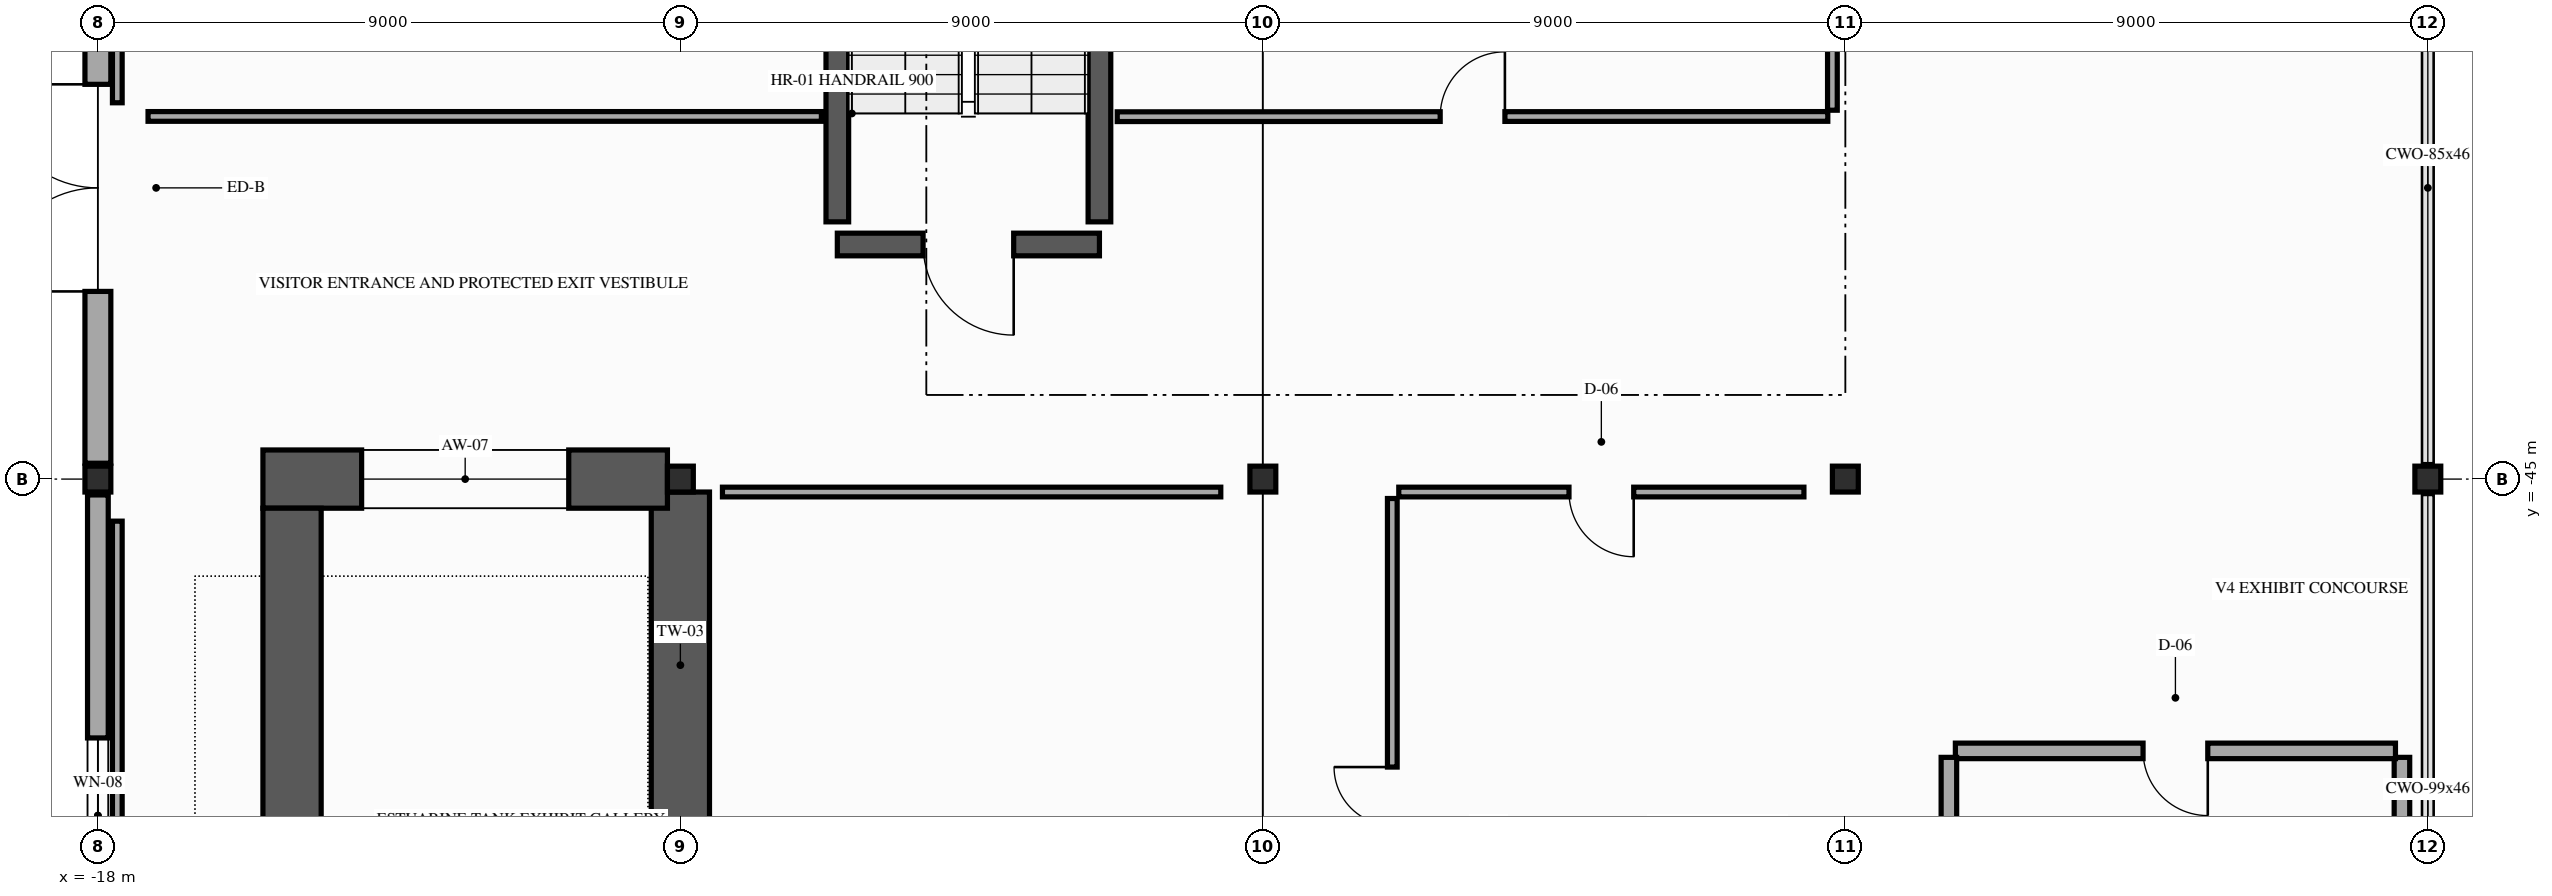
"""IFC4 building model, lengths in metres.
Left out: names, types, materials, properties, quantities, classifications, styles, units other than length and angle.
Written with IfcOpenShell. Run it as: python <this file> out.ifc"""

import sys

from ifc_helpers import new_model, si_unit, direction, frame, frame_2d, origin, origin_2d, place, context, subcontext, project, spatial, rectangle, i_section, extrude, element, fill, save


model = new_model("IFC4")
c1 = context("Model", 3, precision=1e-05, world=origin(), true_north=direction((0.0, 1.0)))
c2 = subcontext(c1, "Body", "Model", "MODEL_VIEW")
j1 = project(units=[si_unit("LENGTHUNIT", "METRE"), si_unit("PLANEANGLEUNIT", "RADIAN")], contexts=[c1])
p1 = place(None, origin())
s1 = spatial("IfcSite", under=j1, at=p1, CompositionType="ELEMENT")
p2 = place(p1, origin())
s2 = spatial("IfcBuilding", under=s1, at=p2, CompositionType="ELEMENT")
p3 = place(p2, origin())
s3 = spatial("IfcBuildingStorey", under=s2, at=p3, CompositionType="ELEMENT", Elevation=0.0)
for number, where, z_axis, x_axis in (
    (1, (-18.0, -45.0, 0.0), (0.0, 0.0, 1.0), (1.0, 0.0, 0.0)),
    (2, (-9.0, -45.0, 0.0), (0.0, 0.0, 1.0), (1.0, 0.0, 0.0)),
    (3, (0.0, -45.0, 0.0), (0.0, 0.0, 1.0), (1.0, 0.0, 0.0)),
    (4, (9.0, -45.0, 0.0), (0.0, 0.0, 1.0), (1.0, 0.0, 0.0)),
    (5, (18.0, -45.0, 0.0), (0.0, 0.0, 1.0), (1.0, 0.0, 0.0)),
):
    element("IfcColumn", number, at=place(p3, frame(where, z_axis=z_axis, x_axis=x_axis)), inside=s3, PredefinedType="COLUMN", context=c2, shape_type="SweptSolid", body=[
        extrude(i_section(OverallWidth=0.4, OverallDepth=0.4, WebThickness=0.013, FlangeThickness=0.021, FilletRadius=0.022, at=origin_2d()), origin(), (0.0, 0.0, 1.0), 5.4),
    ])
p4 = place(p3, frame((-9.0, -50.55, 0.0), z_axis=(0.0, 0.0, 1.0), x_axis=(0.0, 1.0, 0.0)))
e6 = element("IfcWall", 6, at=p4, inside=s3, PredefinedType="SHEAR", context=c2, shape_type="SweptSolid", body=[
    extrude(rectangle(XDim=5.35, YDim=0.9, at=frame_2d((2.675, 0.0))), origin(), (0.0, 0.0, 1.0), 4.5),
])
p5 = place(p3, frame((-9.2, -45.0, 0.0), z_axis=(0.0, 0.0, 1.0), x_axis=(-1.0, 0.0, 0.0)))
e7 = element("IfcWall", 7, at=p5, inside=s3, PredefinedType="SHEAR", context=c2, shape_type="SweptSolid", body=[
    extrude(rectangle(XDim=6.25, YDim=0.9, at=frame_2d((3.125, 0.0))), origin(), (0.0, 0.0, 1.0), 4.5),
])
p6 = place(p5, frame((1.525, 0.0, 0.8)))
e8 = element("IfcOpeningElement", 8, at=p6, cuts=e7, PredefinedType="OPENING", context=c2, shape_type="SweptSolid", body=[
    extrude(rectangle(XDim=3.2, YDim=2.2, at=frame_2d((1.6, 1.1))), frame((0.0, 0.46, 0.0), z_axis=(0.0, -1.0, 0.0), x_axis=(1.0, 0.0, 0.0)), (0.0, 0.0, 1.0), 0.92),
])
p7 = place(p3, frame((-15.0, -45.45, 0.0), z_axis=(0.0, 0.0, 1.0), x_axis=(0.0, -1.0, 0.0)))
e9 = element("IfcWall", 9, at=p7, inside=s3, PredefinedType="SHEAR", context=c2, shape_type="SweptSolid", body=[
    extrude(rectangle(XDim=5.1, YDim=0.9, at=frame_2d((2.55, 0.0))), origin(), (0.0, 0.0, 1.0), 4.5),
])
p8 = place(p3, frame((-18.0, -55.155, 0.0), z_axis=(0.0, 0.0, 1.0), x_axis=(0.0, 1.0, 0.0)))
e10 = element("IfcWall", 10, at=p8, inside=s3, PredefinedType="SOLIDWALL", context=c2, shape_type="SweptSolid", body=[
    extrude(rectangle(XDim=9.91, YDim=0.32, at=frame_2d((4.955, 0.0))), origin(), (0.0, 0.0, 1.0), 4.517),
])
p9 = place(p8, frame((3.755, 0.0, 0.9)))
e11 = element("IfcOpeningElement", 11, at=p9, cuts=e10, PredefinedType="OPENING", context=c2, shape_type="SweptSolid", body=[
    extrude(rectangle(XDim=2.4, YDim=2.4, at=frame_2d((1.2, 1.2))), frame((0.0, 0.17, 0.0), z_axis=(0.0, -1.0, 0.0), x_axis=(1.0, 0.0, 0.0)), (0.0, 0.0, 1.0), 0.34),
])
p10 = place(p3, frame((-18.0, -44.755, 0.0), z_axis=(0.0, 0.0, 1.0), x_axis=(0.0, 1.0, 0.0)))
e12 = element("IfcWall", 12, at=p10, inside=s3, PredefinedType="SOLIDWALL", context=c2, shape_type="SweptSolid", body=[
    extrude(rectangle(XDim=8.51, YDim=0.4, at=frame_2d((4.255, 0.0))), origin(), (0.0, 0.0, 1.0), 4.517),
])
p11 = place(p10, frame((2.655, 0.0, 0.0)))
e13 = element("IfcOpeningElement", 13, at=p11, cuts=e12, PredefinedType="OPENING", context=c2, shape_type="SweptSolid", body=[
    extrude(rectangle(XDim=3.2, YDim=2.8, at=frame_2d((1.6, 1.4))), frame((0.0, 0.21, 0.0), z_axis=(0.0, -1.0, 0.0), x_axis=(1.0, 0.0, 0.0)), (0.0, 0.0, 1.0), 0.42),
])
p12 = place(p3, frame((-2.525, -41.375, 0.0), z_axis=(0.0, 0.0, 1.0), x_axis=(-1.0, 0.0, 0.0)))
e14 = element("IfcWall", 14, at=p12, inside=s3, PredefinedType="SHEAR", context=c2, shape_type="SweptSolid", body=[
    extrude(rectangle(XDim=4.05, YDim=0.35, at=frame_2d((2.025, 0.0))), origin(), (0.0, 0.0, 1.0), 5.12),
])
p13 = place(p12, frame((1.325, 0.0, 0.0)))
e15 = element("IfcOpeningElement", 15, at=p13, cuts=e14, PredefinedType="OPENING", context=c2, shape_type="SweptSolid", body=[
    extrude(rectangle(XDim=1.4, YDim=2.2, at=frame_2d((0.7, 1.1))), frame((0.0, 0.185, 0.0), z_axis=(0.0, -1.0, 0.0), x_axis=(1.0, 0.0, 0.0)), (0.0, 0.0, 1.0), 0.37),
])
for number, where, z_axis, x_axis in (
    (16, (-6.575, -41.025, 0.0), (0.0, 0.0, 1.0), (0.0, 1.0, 0.0)),
    (17, (-2.525, -41.025, 0.0), (0.0, 0.0, 1.0), (0.0, 1.0, 0.0)),
):
    element("IfcWall", number, at=place(p3, frame(where, z_axis=z_axis, x_axis=x_axis)), inside=s3, PredefinedType="SHEAR", context=c2, shape_type="SweptSolid", body=[
        extrude(rectangle(XDim=9.1, YDim=0.35, at=frame_2d((4.55, 0.0))), origin(), (0.0, 0.0, 1.0), 5.12),
    ])
p14 = place(p3, frame((2.0, -55.4, 0.0), z_axis=(0.0, 0.0, 1.0), x_axis=(0.0, 1.0, 0.0)))
e18 = element("IfcWall", 18, at=p14, inside=s3, PredefinedType="PARTITIONING", context=c2, shape_type="SweptSolid", body=[
    extrude(rectangle(XDim=10.1, YDim=0.15, at=frame_2d((5.05, 0.0))), origin(), (0.0, 0.0, 1.0), 3.755),
])
p15 = place(p14, frame((4.15, 0.0, 0.0)))
e19 = element("IfcOpeningElement", 19, at=p15, cuts=e18, PredefinedType="OPENING", context=c2, shape_type="SweptSolid", body=[
    extrude(rectangle(XDim=1.8, YDim=2.3, at=frame_2d((0.9, 1.15))), frame((0.0, 0.085, 0.0), z_axis=(0.0, -1.0, 0.0), x_axis=(1.0, 0.0, 0.0)), (0.0, 0.0, 1.0), 0.17),
])
p16 = place(p3, frame((-0.65, -45.2, 0.0), z_axis=(0.0, 0.0, 1.0), x_axis=(-1.0, 0.0, 0.0)))
e20 = element("IfcWall", 20, at=p16, inside=s3, PredefinedType="PARTITIONING", context=c2, shape_type="SweptSolid", body=[
    extrude(rectangle(XDim=7.7, YDim=0.15, at=frame_2d((3.85, 0.0))), origin(), (0.0, 0.0, 1.0), 4.517),
])
p17 = place(p3, frame((-17.7, -45.65, 0.0), z_axis=(0.0, 0.0, 1.0), x_axis=(0.0, -1.0, 0.0)))
e21 = element("IfcWall", 21, at=p17, inside=s3, PredefinedType="PARTITIONING", context=c2, shape_type="SweptSolid", body=[
    extrude(rectangle(XDim=9.5, YDim=0.15, at=frame_2d((4.75, 0.0))), origin(), (0.0, 0.0, 1.0), 4.617),
])
p18 = place(p3, frame((17.6, -55.15, 0.0), z_axis=(0.0, 0.0, 1.0), x_axis=(0.0, 1.0, 0.0)))
e22 = element("IfcWall", 22, at=p18, inside=s3, PredefinedType="PARTITIONING", context=c2, shape_type="SweptSolid", body=[
    extrude(rectangle(XDim=5.85, YDim=0.24, at=frame_2d((2.925, 0.0))), origin(), (0.0, 0.0, 1.0), 4.617),
])
p19 = place(p3, frame((17.5, -49.2, 0.0), z_axis=(0.0, 0.0, 1.0), x_axis=(-1.0, 0.0, 0.0)))
e23 = element("IfcWall", 23, at=p19, inside=s3, PredefinedType="PARTITIONING", context=c2, shape_type="SweptSolid", body=[
    extrude(rectangle(XDim=6.8, YDim=0.24, at=frame_2d((3.4, 0.0))), origin(), (0.0, 0.0, 1.0), 4.617),
])
p20 = place(p19, frame((2.9, 0.0, 0.0)))
e24 = element("IfcOpeningElement", 24, at=p20, cuts=e23, PredefinedType="OPENING", context=c2, shape_type="SweptSolid", body=[
    extrude(rectangle(XDim=1.0, YDim=2.15, at=frame_2d((0.5, 1.075))), frame((0.0, 0.13, 0.0), z_axis=(0.0, -1.0, 0.0), x_axis=(1.0, 0.0, 0.0)), (0.0, 0.0, 1.0), 0.26),
])
p21 = place(p3, frame((10.6, -49.3, 0.0), z_axis=(0.0, 0.0, 1.0), x_axis=(0.0, -1.0, 0.0)))
e25 = element("IfcWall", 25, at=p21, inside=s3, PredefinedType="PARTITIONING", context=c2, shape_type="SweptSolid", body=[
    extrude(rectangle(XDim=6.1, YDim=0.24, at=frame_2d((3.05, 0.0))), origin(), (0.0, 0.0, 1.0), 4.517),
])
p22 = place(p3, frame((-17.7, -36.64, 0.0), z_axis=(0.0, 0.0, 1.0), x_axis=(0.0, -1.0, 0.0)))
e26 = element("IfcWall", 26, at=p22, inside=s3, PredefinedType="PARTITIONING", context=c2, shape_type="SweptSolid", body=[
    extrude(rectangle(XDim=2.545, YDim=0.15, at=frame_2d((1.272, 0.0))), origin(), (0.0, 0.0, 1.0), 4.605),
])
p23 = place(p3, frame((-17.225, -39.396, 0.0), z_axis=(0.0, 0.0, 1.0), x_axis=(1.0, 0.0, 0.0)))
e27 = element("IfcWall", 27, at=p23, inside=s3, PredefinedType="PARTITIONING", context=c2, shape_type="SweptSolid", body=[
    extrude(rectangle(XDim=10.404, YDim=0.15, at=frame_2d((5.202, 0.0))), origin(), (0.0, 0.0, 1.0), 4.605),
])
p24 = place(p3, frame((-2.25, -39.4, 0.0), z_axis=(0.0, 0.0, 1.0), x_axis=(0.999999936706, 0.000355792728, 0.0)))
e28 = element("IfcWall", 28, at=p24, inside=s3, PredefinedType="PARTITIONING", context=c2, shape_type="SweptSolid", body=[
    extrude(rectangle(XDim=10.979, YDim=0.15, at=frame_2d((5.49, 0.0))), origin(), (0.0, 0.0, 1.0), 4.605),
])
p25 = place(p24, frame((4.99, 0.0, 0.0)))
e29 = element("IfcOpeningElement", 29, at=p25, cuts=e28, PredefinedType="OPENING", context=c2, shape_type="SweptSolid", body=[
    extrude(rectangle(XDim=1.0, YDim=2.15, at=frame_2d((0.5, 1.075))), frame((0.0, 0.085, 0.0), z_axis=(0.0, -1.0, 0.0), x_axis=(1.0, 0.0, 0.0)), (0.0, 0.0, 1.0), 0.17),
])
p26 = place(p3, frame((8.8, -39.3, 0.0), z_axis=(0.0, 0.0, 1.0), x_axis=(0.0, 1.0, 0.0)))
e30 = element("IfcWall", 30, at=p26, inside=s3, PredefinedType="PARTITIONING", context=c2, shape_type="SweptSolid", body=[
    extrude(rectangle(XDim=2.66, YDim=0.15, at=frame_2d((1.33, 0.0))), origin(), (0.0, 0.0, 1.0), 4.605),
])
p27 = place(p3, frame((8.36, -45.2, 0.0), z_axis=(0.0, 0.0, 1.0), x_axis=(-1.0, 0.0, 0.0)))
e31 = element("IfcWall", 31, at=p27, inside=s3, PredefinedType="PARTITIONING", context=c2, shape_type="SweptSolid", body=[
    extrude(rectangle(XDim=6.26, YDim=0.15, at=frame_2d((3.13, 0.0))), origin(), (0.0, 0.0, 1.0), 4.517),
])
p28 = place(p27, frame((2.63, 0.0, 0.0)))
e32 = element("IfcOpeningElement", 32, at=p28, cuts=e31, PredefinedType="OPENING", context=c2, shape_type="SweptSolid", body=[
    extrude(rectangle(XDim=1.0, YDim=2.15, at=frame_2d((0.5, 1.075))), frame((0.0, 0.085, 0.0), z_axis=(0.0, -1.0, 0.0), x_axis=(1.0, 0.0, 0.0)), (0.0, 0.0, 1.0), 0.17),
])
p29 = place(p6, origin())
e33 = element("IfcWindow", 33, at=p29, inside=s3, PartitioningType="SINGLE_PANEL", PredefinedType="WINDOW", context=c2, shape_type="SweptSolid", body=[
    extrude(rectangle(XDim=3.2, YDim=2.2, at=frame_2d((1.6, 1.1))), frame((0.0, 0.03, 0.0), z_axis=(0.0, -1.0, 0.0), x_axis=(1.0, 0.0, 0.0)), (0.0, 0.0, 1.0), 0.06),
])
fill(e8, e33)
p30 = place(p9, origin())
e34 = element("IfcWindow", 34, at=p30, inside=s3, PartitioningType="SINGLE_PANEL", PredefinedType="WINDOW", context=c2, shape_type="SweptSolid", body=[
    extrude(rectangle(XDim=2.4, YDim=2.4, at=frame_2d((1.2, 1.2))), frame((0.0, 0.03, 0.0), z_axis=(0.0, -1.0, 0.0), x_axis=(1.0, 0.0, 0.0)), (0.0, 0.0, 1.0), 0.06),
])
fill(e11, e34)
p31 = place(p11, origin())
e35 = element("IfcDoor", 35, at=p31, inside=s3, OperationType="DOUBLE_DOOR_SINGLE_SWING", PredefinedType="DOOR", context=c2, shape_type="SweptSolid", body=[
    extrude(rectangle(XDim=3.2, YDim=2.8, at=frame_2d((1.6, 1.4))), frame((0.0, 0.025, 0.0), z_axis=(0.0, -1.0, 0.0), x_axis=(1.0, 0.0, 0.0)), (0.0, 0.0, 1.0), 0.05),
])
fill(e13, e35)
p32 = place(p13, origin())
e36 = element("IfcDoor", 36, at=p32, inside=s3, OperationType="SINGLE_SWING_LEFT", PredefinedType="DOOR", context=c2, shape_type="SweptSolid", body=[
    extrude(rectangle(XDim=1.4, YDim=2.2, at=frame_2d((0.7, 1.1))), frame((0.0, 0.025, 0.0), z_axis=(0.0, -1.0, 0.0), x_axis=(1.0, 0.0, 0.0)), (0.0, 0.0, 1.0), 0.05),
])
fill(e15, e36)
p33 = place(p15, origin())
e37 = element("IfcDoor", 37, at=p33, inside=s3, OperationType="DOUBLE_DOOR_SINGLE_SWING", PredefinedType="DOOR", context=c2, shape_type="SweptSolid", body=[
    extrude(rectangle(XDim=1.8, YDim=2.3, at=frame_2d((0.9, 1.15))), frame((0.0, 0.025, 0.0), z_axis=(0.0, -1.0, 0.0), x_axis=(1.0, 0.0, 0.0)), (0.0, 0.0, 1.0), 0.05),
])
fill(e19, e37)
p34 = place(p20, origin())
e38 = element("IfcDoor", 38, at=p34, inside=s3, OperationType="SINGLE_SWING_LEFT", PredefinedType="DOOR", context=c2, shape_type="SweptSolid", body=[
    extrude(rectangle(XDim=1.0, YDim=2.15, at=frame_2d((0.5, 1.075))), frame((0.0, 0.025, 0.0), z_axis=(0.0, -1.0, 0.0), x_axis=(1.0, 0.0, 0.0)), (0.0, 0.0, 1.0), 0.05),
])
fill(e24, e38)
p35 = place(p25, origin())
e39 = element("IfcDoor", 39, at=p35, inside=s3, OperationType="SINGLE_SWING_RIGHT", PredefinedType="DOOR", context=c2, shape_type="SweptSolid", body=[
    extrude(rectangle(XDim=1.0, YDim=2.15, at=frame_2d((0.5, 1.075))), frame((0.0, 0.025, 0.0), z_axis=(0.0, -1.0, 0.0), x_axis=(1.0, 0.0, 0.0)), (0.0, 0.0, 1.0), 0.05),
])
fill(e29, e39)
p36 = place(p28, origin())
e40 = element("IfcDoor", 40, at=p36, inside=s3, OperationType="SINGLE_SWING_LEFT", PredefinedType="DOOR", context=c2, shape_type="SweptSolid", body=[
    extrude(rectangle(XDim=1.0, YDim=2.15, at=frame_2d((0.5, 1.075))), frame((0.0, 0.025, 0.0), z_axis=(0.0, -1.0, 0.0), x_axis=(1.0, 0.0, 0.0)), (0.0, 0.0, 1.0), 0.05),
])
fill(e32, e40)
save(model, sys.argv[1])
